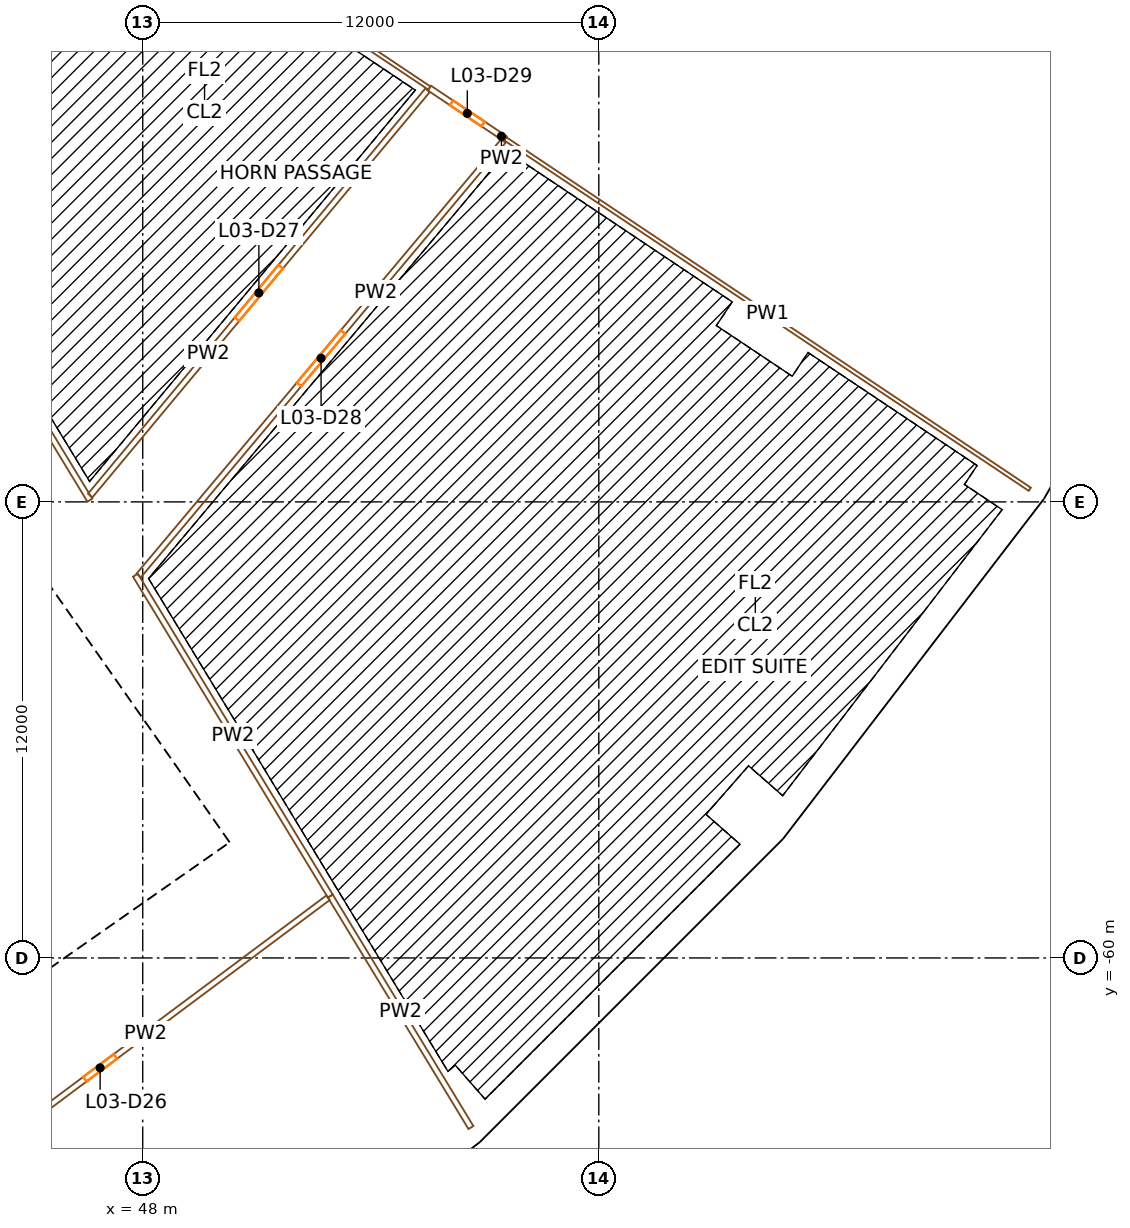
"""IFC4 building model, lengths in metres.
Left out: names, types, materials, properties, quantities, classifications, styles, units other than length and angle.
Written with IfcOpenShell. Run it as: python <this file> out.ifc"""

import sys

from ifc_helpers import new_model, si_unit, direction, frame, frame_2d, origin, origin_2d, place, context, subcontext, project, spatial, rectangle, extrude, element, fill, save


model = new_model("IFC4")
c1 = context("Model", 3, precision=1e-05, world=origin(), true_north=direction((0.0, 1.0)))
c2 = subcontext(c1, "Body", "Model", "MODEL_VIEW")
j1 = project(units=[si_unit("LENGTHUNIT", "METRE"), si_unit("PLANEANGLEUNIT", "RADIAN")], contexts=[c1])
p1 = place(None, origin())
s1 = spatial("IfcSite", under=j1, at=p1, CompositionType="ELEMENT")
p2 = place(p1, origin())
s2 = spatial("IfcBuilding", under=s1, at=p2, CompositionType="ELEMENT")
p3 = place(p2, frame((0.0, 0.0, 27.0)))
s3 = spatial("IfcBuildingStorey", under=s2, at=p3, CompositionType="ELEMENT", Elevation=27.0)
p4 = place(p3, frame((51.264, -58.456, 0.0), z_axis=(0.0, 0.0, 1.0), x_axis=(0.751839807479, 0.6593458151, 0.0)))
e1 = element("IfcColumn", 1, at=p4, inside=s3, PredefinedType="COLUMN", context=c2, shape_type="SweptSolid", body=[
    extrude(rectangle(XDim=1.4, YDim=1.8, at=origin_2d()), origin(), (0.0, 0.0, 1.0), 4.5),
])
p5 = place(p3, frame((56.209, -64.094, 0.0), z_axis=(0.0, 0.0, 1.0), x_axis=(0.751839807479, 0.6593458151, 0.0)))
e2 = element("IfcColumn", 2, at=p5, inside=s3, PredefinedType="COLUMN", context=c2, shape_type="SweptSolid", body=[
    extrude(rectangle(XDim=1.1, YDim=1.3, at=origin_2d()), origin(), (0.0, 0.0, 1.0), 4.5),
])
p6 = place(p3, frame((58.456, -51.264, 0.0), z_axis=(0.0, 0.0, 1.0), x_axis=(0.6593458151, 0.751839807479, 0.0)))
e3 = element("IfcColumn", 3, at=p6, inside=s3, PredefinedType="COLUMN", context=c2, shape_type="SweptSolid", body=[
    extrude(rectangle(XDim=1.4, YDim=1.8, at=origin_2d()), origin(), (0.0, 0.0, 1.0), 4.5),
])
p7 = place(p3, frame((64.094, -56.209, 0.0), z_axis=(0.0, 0.0, 1.0), x_axis=(0.6593458151, 0.751839807479, 0.0)))
e4 = element("IfcColumn", 4, at=p7, inside=s3, PredefinedType="COLUMN", context=c2, shape_type="SweptSolid", body=[
    extrude(rectangle(XDim=1.1, YDim=1.3, at=origin_2d()), origin(), (0.0, 0.0, 1.0), 4.5),
])
p8 = place(p3, frame((64.647, -43.196, 0.0), z_axis=(0.0, 0.0, 1.0), x_axis=(0.55557023302, 0.831469612303, 0.0)))
e5 = element("IfcColumn", 5, at=p8, inside=s3, PredefinedType="COLUMN", context=c2, shape_type="SweptSolid", body=[
    extrude(rectangle(XDim=1.4, YDim=1.8, at=origin_2d()), origin(), (0.0, 0.0, 1.0), 4.5),
])
p9 = place(p3, frame((70.883, -47.362, 0.0), z_axis=(0.0, 0.0, 1.0), x_axis=(0.55557023302, 0.831469612303, 0.0)))
e6 = element("IfcColumn", 6, at=p9, inside=s3, PredefinedType="COLUMN", context=c2, shape_type="SweptSolid", body=[
    extrude(rectangle(XDim=1.1, YDim=1.3, at=origin_2d()), origin(), (0.0, 0.0, 1.0), 4.5),
])
p10 = place(p3, frame((49.779, -57.191, 0.0), z_axis=(0.0, 0.0, 1.0), x_axis=(-0.573577477574, 0.819151315216, 0.0)))
e7 = element("IfcWall", 7, at=p10, inside=s3, PredefinedType="SHEAR", context=c2, shape_type="SweptSolid", body=[
    extrude(rectangle(XDim=14.8, YDim=0.9, at=frame_2d((7.4, 0.0))), origin(), (0.0, 0.0, 1.0), 4.1),
])
p11 = place(p10, frame((6.7, 0.0, 0.0)))
e8 = element("IfcOpeningElement", 8, at=p11, cuts=e7, PredefinedType="OPENING", context=c2, shape_type="SweptSolid", body=[
    extrude(rectangle(XDim=1.4, YDim=2.1, at=frame_2d((0.7, 1.05))), frame((0.0, 0.46, 0.0), z_axis=(0.0, -1.0, 0.0), x_axis=(1.0, 0.0, 0.0)), (0.0, 0.0, 1.0), 0.92),
])
p12 = place(p3, frame((36.827, -65.71, 0.0), z_axis=(0.0, 0.0, 1.0), x_axis=(0.819153391756, 0.573574511963, 0.0)))
e9 = element("IfcWall", 9, at=p12, inside=s3, PredefinedType="SHEAR", context=c2, shape_type="SweptSolid", body=[
    extrude(rectangle(XDim=15.045, YDim=0.9, at=frame_2d((7.523, 0.0))), origin(), (0.0, 0.0, 1.0), 4.1),
])
p13 = place(p12, frame((1.05, 0.0, 0.0)))
e10 = element("IfcOpeningElement", 10, at=p13, cuts=e9, PredefinedType="OPENING", context=c2, shape_type="SweptSolid", body=[
    extrude(rectangle(XDim=1.0, YDim=2.1, at=frame_2d((0.5, 1.05))), frame((0.0, 0.46, 0.0), z_axis=(0.0, -1.0, 0.0), x_axis=(1.0, 0.0, 0.0)), (0.0, 0.0, 1.0), 0.92),
])
p14 = place(p12, frame((3.625, 0.0, 0.0)))
e11 = element("IfcOpeningElement", 11, at=p14, cuts=e9, PredefinedType="OPENING", context=c2, shape_type="SweptSolid", body=[
    extrude(rectangle(XDim=1.0, YDim=2.1, at=frame_2d((0.5, 1.05))), frame((0.0, 0.46, 0.0), z_axis=(0.0, -1.0, 0.0), x_axis=(1.0, 0.0, 0.0)), (0.0, 0.0, 1.0), 0.92),
])
p15 = place(p12, frame((6.075, 0.0, 0.0)))
e12 = element("IfcOpeningElement", 12, at=p15, cuts=e9, PredefinedType="OPENING", context=c2, shape_type="SweptSolid", body=[
    extrude(rectangle(XDim=1.0, YDim=2.1, at=frame_2d((0.5, 1.05))), frame((0.0, 0.46, 0.0), z_axis=(0.0, -1.0, 0.0), x_axis=(1.0, 0.0, 0.0)), (0.0, 0.0, 1.0), 0.92),
])
p16 = place(p12, frame((13.495, 0.0, 0.0)))
e13 = element("IfcOpeningElement", 13, at=p16, cuts=e9, PredefinedType="OPENING", context=c2, shape_type="SweptSolid", body=[
    extrude(rectangle(XDim=1.1, YDim=2.1, at=frame_2d((0.55, 1.05))), frame((0.0, 0.46, 0.0), z_axis=(0.0, -1.0, 0.0), x_axis=(1.0, 0.0, 0.0)), (0.0, 0.0, 1.0), 0.92),
])
p17 = place(p3, frame((41.262, -57.661, 0.0), z_axis=(0.0, 0.0, 1.0), x_axis=(0.819164398642, 0.573558792102, 0.0)))
e14 = element("IfcWall", 14, at=p17, inside=s3, PredefinedType="SOLIDWALL", context=c2, shape_type="SweptSolid", body=[
    extrude(rectangle(XDim=6.795, YDim=0.3, at=frame_2d((3.397, 0.0))), origin(), (0.0, 0.0, 1.0), 4.1),
])
p18 = place(p17, frame((5.32, 0.0, 0.0)))
e15 = element("IfcOpeningElement", 15, at=p18, cuts=e14, PredefinedType="OPENING", context=c2, shape_type="SweptSolid", body=[
    extrude(rectangle(XDim=1.1, YDim=2.1, at=frame_2d((0.55, 1.05))), frame((0.0, 0.16, 0.0), z_axis=(0.0, -1.0, 0.0), x_axis=(1.0, 0.0, 0.0)), (0.0, 0.0, 1.0), 0.32),
])
p19 = place(p3, frame((47.839, -71.491, 0.0), z_axis=(0.0, 0.0, 1.0), x_axis=(0.793355377778, 0.608758773695, 0.0)))
e16 = element("IfcWall", 16, at=p19, inside=s3, PredefinedType="SOLIDWALL", context=c2, shape_type="SweptSolid", body=[
    extrude(rectangle(XDim=11.135, YDim=0.45, at=frame_2d((5.567, 0.0))), origin(), (0.0, 0.0, 1.0), 3.2),
])
p20 = place(p19, frame((3.917, 0.0, 0.9)))
e17 = element("IfcOpeningElement", 17, at=p20, cuts=e16, PredefinedType="OPENING", context=c2, shape_type="SweptSolid", body=[
    extrude(rectangle(XDim=1.2, YDim=2.15, at=frame_2d((0.6, 1.075))), frame((0.0, 0.235, 0.0), z_axis=(0.0, -1.0, 0.0), x_axis=(1.0, 0.0, 0.0)), (0.0, 0.0, 1.0), 0.47),
])
p21 = place(p19, frame((6.017, 0.0, 0.9)))
e18 = element("IfcOpeningElement", 18, at=p21, cuts=e16, PredefinedType="OPENING", context=c2, shape_type="SweptSolid", body=[
    extrude(rectangle(XDim=1.2, YDim=2.15, at=frame_2d((0.6, 1.075))), frame((0.0, 0.235, 0.0), z_axis=(0.0, -1.0, 0.0), x_axis=(1.0, 0.0, 0.0)), (0.0, 0.0, 1.0), 0.47),
])
p22 = place(p3, frame((56.699, -64.698, 0.0), z_axis=(0.0, 0.0, 1.0), x_axis=(0.707106781187, 0.707106781187, 0.0)))
e19 = element("IfcWall", 19, at=p22, inside=s3, PredefinedType="SOLIDWALL", context=c2, shape_type="SweptSolid", body=[
    extrude(rectangle(XDim=11.312, YDim=0.45, at=frame_2d((5.656, 0.0))), origin(), (0.0, 0.0, 1.0), 3.2),
])
p23 = place(p22, frame((4.006, 0.0, 0.9)))
e20 = element("IfcOpeningElement", 20, at=p23, cuts=e19, PredefinedType="OPENING", context=c2, shape_type="SweptSolid", body=[
    extrude(rectangle(XDim=1.2, YDim=2.15, at=frame_2d((0.6, 1.075))), frame((0.0, 0.235, 0.0), z_axis=(0.0, -1.0, 0.0), x_axis=(1.0, 0.0, 0.0)), (0.0, 0.0, 1.0), 0.47),
])
p24 = place(p22, frame((6.106, 0.0, 0.9)))
e21 = element("IfcOpeningElement", 21, at=p24, cuts=e19, PredefinedType="OPENING", context=c2, shape_type="SweptSolid", body=[
    extrude(rectangle(XDim=1.2, YDim=2.15, at=frame_2d((0.6, 1.075))), frame((0.0, 0.235, 0.0), z_axis=(0.0, -1.0, 0.0), x_axis=(1.0, 0.0, 0.0)), (0.0, 0.0, 1.0), 0.47),
])
p25 = place(p3, frame((64.713, -56.673, 0.0), z_axis=(0.0, 0.0, 1.0), x_axis=(0.608758773695, 0.793355377778, 0.0)))
e22 = element("IfcWall", 22, at=p25, inside=s3, PredefinedType="SOLIDWALL", context=c2, shape_type="SweptSolid", body=[
    extrude(rectangle(XDim=11.135, YDim=0.45, at=frame_2d((5.567, 0.0))), origin(), (0.0, 0.0, 1.0), 3.2),
])
p26 = place(p25, frame((3.917, 0.0, 0.9)))
e23 = element("IfcOpeningElement", 23, at=p26, cuts=e22, PredefinedType="OPENING", context=c2, shape_type="SweptSolid", body=[
    extrude(rectangle(XDim=1.2, YDim=2.15, at=frame_2d((0.6, 1.075))), frame((0.0, 0.235, 0.0), z_axis=(0.0, -1.0, 0.0), x_axis=(1.0, 0.0, 0.0)), (0.0, 0.0, 1.0), 0.47),
])
p27 = place(p25, frame((6.017, 0.0, 0.9)))
e24 = element("IfcOpeningElement", 24, at=p27, cuts=e22, PredefinedType="OPENING", context=c2, shape_type="SweptSolid", body=[
    extrude(rectangle(XDim=1.2, YDim=2.15, at=frame_2d((0.6, 1.075))), frame((0.0, 0.235, 0.0), z_axis=(0.0, -1.0, 0.0), x_axis=(1.0, 0.0, 0.0)), (0.0, 0.0, 1.0), 0.47),
])
p28 = place(p3, frame((71.512, -47.819, 0.0), z_axis=(0.0, 0.0, 1.0), x_axis=(0.500001430823, 0.866024577697, 0.0)))
e25 = element("IfcWall", 25, at=p28, inside=s3, PredefinedType="SOLIDWALL", context=c2, shape_type="SweptSolid", body=[
    extrude(rectangle(XDim=11.312, YDim=0.45, at=frame_2d((5.656, 0.0))), origin(), (0.0, 0.0, 1.0), 3.2),
])
p29 = place(p28, frame((4.006, 0.0, 0.9)))
e26 = element("IfcOpeningElement", 26, at=p29, cuts=e25, PredefinedType="OPENING", context=c2, shape_type="SweptSolid", body=[
    extrude(rectangle(XDim=1.2, YDim=2.15, at=frame_2d((0.6, 1.075))), frame((0.0, 0.235, 0.0), z_axis=(0.0, -1.0, 0.0), x_axis=(1.0, 0.0, 0.0)), (0.0, 0.0, 1.0), 0.47),
])
p30 = place(p28, frame((6.106, 0.0, 0.9)))
e27 = element("IfcOpeningElement", 27, at=p30, cuts=e25, PredefinedType="OPENING", context=c2, shape_type="SweptSolid", body=[
    extrude(rectangle(XDim=1.2, YDim=2.15, at=frame_2d((0.6, 1.075))), frame((0.0, 0.235, 0.0), z_axis=(0.0, -1.0, 0.0), x_axis=(1.0, 0.0, 0.0)), (0.0, 0.0, 1.0), 0.47),
])
p31 = place(p3, frame((52.875, -58.417, 0.0), z_axis=(0.0, 0.0, 1.0), x_axis=(-0.801483412858, -0.598017005539, 0.0)))
e28 = element("IfcWall", 28, at=p31, inside=s3, PredefinedType="PARTITIONING", context=c2, shape_type="SweptSolid", body=[
    extrude(rectangle(XDim=14.965, YDim=0.15, at=frame_2d((7.483, 0.0))), origin(), (0.0, 0.0, 1.0), 3.1),
])
p32 = place(p31, frame((6.983, 0.0, 0.0)))
e29 = element("IfcOpeningElement", 29, at=p32, cuts=e28, PredefinedType="OPENING", context=c2, shape_type="SweptSolid", body=[
    extrude(rectangle(XDim=1.0, YDim=2.1, at=frame_2d((0.5, 1.05))), frame((0.0, 0.085, 0.0), z_axis=(0.0, -1.0, 0.0), x_axis=(1.0, 0.0, 0.0)), (0.0, 0.0, 1.0), 0.17),
])
p33 = place(p3, frame((41.648, -39.789, 0.0), z_axis=(0.0, 0.0, 1.0), x_axis=(0.519144162426, -0.854686690325, 0.0)))
e30 = element("IfcWall", 30, at=p33, inside=s3, PredefinedType="PARTITIONING", context=c2, shape_type="SweptSolid", body=[
    extrude(rectangle(XDim=9.554, YDim=0.15, at=frame_2d((4.777, 0.0))), origin(), (0.0, 0.0, 1.0), 3.1),
])
p34 = place(p3, frame((46.617, -47.833, 0.0), z_axis=(0.0, 0.0, 1.0), x_axis=(0.639786242962, 0.768552902093, 0.0)))
e31 = element("IfcWall", 31, at=p34, inside=s3, PredefinedType="PARTITIONING", context=c2, shape_type="SweptSolid", body=[
    extrude(rectangle(XDim=13.875, YDim=0.15, at=frame_2d((6.938, 0.0))), origin(), (0.0, 0.0, 1.0), 3.1),
])
p35 = place(p34, frame((6.037, 0.0, 0.0)))
e32 = element("IfcOpeningElement", 32, at=p35, cuts=e31, PredefinedType="OPENING", context=c2, shape_type="SweptSolid", body=[
    extrude(rectangle(XDim=1.8, YDim=2.1, at=frame_2d((0.9, 1.05))), frame((0.0, 0.085, 0.0), z_axis=(0.0, -1.0, 0.0), x_axis=(1.0, 0.0, 0.0)), (0.0, 0.0, 1.0), 0.17),
])
p36 = place(p3, frame((47.808, -49.929, 0.0), z_axis=(0.0, 0.0, 1.0), x_axis=(0.519169679695, -0.854671190392, 0.0)))
e33 = element("IfcWall", 33, at=p36, inside=s3, PredefinedType="PARTITIONING", context=c2, shape_type="SweptSolid", body=[
    extrude(rectangle(XDim=9.878, YDim=0.15, at=frame_2d((4.939, 0.0))), origin(), (0.0, 0.0, 1.0), 3.1),
])
p37 = place(p3, frame((57.49, -38.503, 0.0), z_axis=(0.0, 0.0, 1.0), x_axis=(-0.642835259292, -0.766004457828, 0.0)))
e34 = element("IfcWall", 34, at=p37, inside=s3, PredefinedType="PARTITIONING", context=c2, shape_type="SweptSolid", body=[
    extrude(rectangle(XDim=14.926, YDim=0.15, at=frame_2d((7.463, 0.0))), origin(), (0.0, 0.0, 1.0), 3.1),
])
p38 = place(p37, frame((6.563, 0.0, 0.0)))
e35 = element("IfcOpeningElement", 35, at=p38, cuts=e34, PredefinedType="OPENING", context=c2, shape_type="SweptSolid", body=[
    extrude(rectangle(XDim=1.8, YDim=2.1, at=frame_2d((0.9, 1.05))), frame((0.0, 0.085, 0.0), z_axis=(0.0, -1.0, 0.0), x_axis=(1.0, 0.0, 0.0)), (0.0, 0.0, 1.0), 0.17),
])
p39 = place(p3, frame((52.936, -58.372, 0.0), z_axis=(0.0, 0.0, 1.0), x_axis=(0.519148894699, -0.854683815883, 0.0)))
e36 = element("IfcWall", 36, at=p39, inside=s3, PredefinedType="PARTITIONING", context=c2, shape_type="SweptSolid", body=[
    extrude(rectangle(XDim=7.125, YDim=0.15, at=frame_2d((3.563, 0.0))), origin(), (0.0, 0.0, 1.0), 3.1),
])
p40 = place(p3, frame((55.542, -37.112, 0.0), z_axis=(0.0, 0.0, 1.0), x_axis=(-0.831472868546, 0.555565359677, 0.0)))
e37 = element("IfcWall", 37, at=p40, inside=s3, PredefinedType="PARTITIONING", context=c2, shape_type="SweptSolid", body=[
    extrude(rectangle(XDim=16.6, YDim=0.1, at=frame_2d((8.3, 0.0))), origin(), (0.0, 0.0, 1.0), 3.1),
])
p41 = place(p3, frame((55.542, -37.112, 0.0), z_axis=(0.0, 0.0, 1.0), x_axis=(0.831423745392, -0.555638871569, 0.0)))
e38 = element("IfcWall", 38, at=p41, inside=s3, PredefinedType="PARTITIONING", context=c2, shape_type="SweptSolid", body=[
    extrude(rectangle(XDim=2.4, YDim=0.15, at=frame_2d((1.2, 0.0))), origin(), (0.0, 0.0, 1.0), 3.1),
])
p42 = place(p41, frame((0.7, 0.0, 0.0)))
e39 = element("IfcOpeningElement", 39, at=p42, cuts=e38, PredefinedType="OPENING", context=c2, shape_type="SweptSolid", body=[
    extrude(rectangle(XDim=1.0, YDim=2.1, at=frame_2d((0.5, 1.05))), frame((0.0, 0.085, 0.0), z_axis=(0.0, -1.0, 0.0), x_axis=(1.0, 0.0, 0.0)), (0.0, 0.0, 1.0), 0.17),
])
p43 = place(p3, frame((71.34, -47.668, 0.0), z_axis=(0.0, 0.0, 1.0), x_axis=(-0.831472868546, 0.555565359677, 0.0)))
e40 = element("IfcWall", 40, at=p43, inside=s3, PredefinedType="PARTITIONING", context=c2, shape_type="SweptSolid", body=[
    extrude(rectangle(XDim=16.6, YDim=0.1, at=frame_2d((8.3, 0.0))), origin(), (0.0, 0.0, 1.0), 3.1),
])
p44 = place(p11, origin())
e41 = element("IfcDoor", 41, at=p44, inside=s3, OperationType="DOUBLE_DOOR_SINGLE_SWING", PredefinedType="DOOR", context=c2, shape_type="SweptSolid", body=[
    extrude(rectangle(XDim=1.4, YDim=2.1, at=frame_2d((0.7, 1.05))), frame((0.0, 0.025, 0.0), z_axis=(0.0, -1.0, 0.0), x_axis=(1.0, 0.0, 0.0)), (0.0, 0.0, 1.0), 0.05),
])
fill(e8, e41)
p45 = place(p16, origin())
e42 = element("IfcDoor", 42, at=p45, inside=s3, OperationType="SINGLE_SWING_LEFT", PredefinedType="DOOR", context=c2, shape_type="SweptSolid", body=[
    extrude(rectangle(XDim=1.1, YDim=2.1, at=frame_2d((0.55, 1.05))), frame((0.0, 0.025, 0.0), z_axis=(0.0, -1.0, 0.0), x_axis=(1.0, 0.0, 0.0)), (0.0, 0.0, 1.0), 0.05),
])
fill(e13, e42)
p46 = place(p18, origin())
e43 = element("IfcDoor", 43, at=p46, inside=s3, OperationType="SINGLE_SWING_LEFT", PredefinedType="DOOR", context=c2, shape_type="SweptSolid", body=[
    extrude(rectangle(XDim=1.1, YDim=2.1, at=frame_2d((0.55, 1.05))), frame((0.0, 0.025, 0.0), z_axis=(0.0, -1.0, 0.0), x_axis=(1.0, 0.0, 0.0)), (0.0, 0.0, 1.0), 0.05),
])
fill(e15, e43)
p47 = place(p23, origin())
e44 = element("IfcWindow", 44, at=p47, inside=s3, PartitioningType="SINGLE_PANEL", PredefinedType="WINDOW", context=c2, shape_type="SweptSolid", body=[
    extrude(rectangle(XDim=1.2, YDim=2.15, at=frame_2d((0.6, 1.075))), frame((0.0, 0.03, 0.0), z_axis=(0.0, -1.0, 0.0), x_axis=(1.0, 0.0, 0.0)), (0.0, 0.0, 1.0), 0.06),
])
fill(e20, e44)
p48 = place(p24, origin())
e45 = element("IfcWindow", 45, at=p48, inside=s3, PartitioningType="SINGLE_PANEL", PredefinedType="WINDOW", context=c2, shape_type="SweptSolid", body=[
    extrude(rectangle(XDim=1.2, YDim=2.15, at=frame_2d((0.6, 1.075))), frame((0.0, 0.03, 0.0), z_axis=(0.0, -1.0, 0.0), x_axis=(1.0, 0.0, 0.0)), (0.0, 0.0, 1.0), 0.06),
])
fill(e21, e45)
p49 = place(p26, origin())
e46 = element("IfcWindow", 46, at=p49, inside=s3, PartitioningType="SINGLE_PANEL", PredefinedType="WINDOW", context=c2, shape_type="SweptSolid", body=[
    extrude(rectangle(XDim=1.2, YDim=2.15, at=frame_2d((0.6, 1.075))), frame((0.0, 0.03, 0.0), z_axis=(0.0, -1.0, 0.0), x_axis=(1.0, 0.0, 0.0)), (0.0, 0.0, 1.0), 0.06),
])
fill(e23, e46)
p50 = place(p27, origin())
e47 = element("IfcWindow", 47, at=p50, inside=s3, PartitioningType="SINGLE_PANEL", PredefinedType="WINDOW", context=c2, shape_type="SweptSolid", body=[
    extrude(rectangle(XDim=1.2, YDim=2.15, at=frame_2d((0.6, 1.075))), frame((0.0, 0.03, 0.0), z_axis=(0.0, -1.0, 0.0), x_axis=(1.0, 0.0, 0.0)), (0.0, 0.0, 1.0), 0.06),
])
fill(e24, e47)
p51 = place(p32, origin())
e48 = element("IfcDoor", 48, at=p51, inside=s3, OperationType="SINGLE_SWING_RIGHT", PredefinedType="DOOR", context=c2, shape_type="SweptSolid", body=[
    extrude(rectangle(XDim=1.0, YDim=2.1, at=frame_2d((0.5, 1.05))), frame((0.0, 0.025, 0.0), z_axis=(0.0, -1.0, 0.0), x_axis=(1.0, 0.0, 0.0)), (0.0, 0.0, 1.0), 0.05),
])
fill(e29, e48)
p52 = place(p35, origin())
e49 = element("IfcDoor", 49, at=p52, inside=s3, OperationType="DOUBLE_DOOR_SINGLE_SWING", PredefinedType="DOOR", context=c2, shape_type="SweptSolid", body=[
    extrude(rectangle(XDim=1.8, YDim=2.1, at=frame_2d((0.9, 1.05))), frame((0.0, 0.025, 0.0), z_axis=(0.0, -1.0, 0.0), x_axis=(1.0, 0.0, 0.0)), (0.0, 0.0, 1.0), 0.05),
])
fill(e32, e49)
p53 = place(p38, origin())
e50 = element("IfcDoor", 50, at=p53, inside=s3, OperationType="DOUBLE_DOOR_SINGLE_SWING", PredefinedType="DOOR", context=c2, shape_type="SweptSolid", body=[
    extrude(rectangle(XDim=1.8, YDim=2.1, at=frame_2d((0.9, 1.05))), frame((0.0, 0.025, 0.0), z_axis=(0.0, -1.0, 0.0), x_axis=(1.0, 0.0, 0.0)), (0.0, 0.0, 1.0), 0.05),
])
fill(e35, e50)
p54 = place(p42, origin())
e51 = element("IfcDoor", 51, at=p54, inside=s3, OperationType="SINGLE_SWING_RIGHT", PredefinedType="DOOR", context=c2, shape_type="SweptSolid", body=[
    extrude(rectangle(XDim=1.0, YDim=2.1, at=frame_2d((0.5, 1.05))), frame((0.0, 0.025, 0.0), z_axis=(0.0, -1.0, 0.0), x_axis=(1.0, 0.0, 0.0)), (0.0, 0.0, 1.0), 0.05),
])
fill(e39, e51)
save(model, sys.argv[1])
